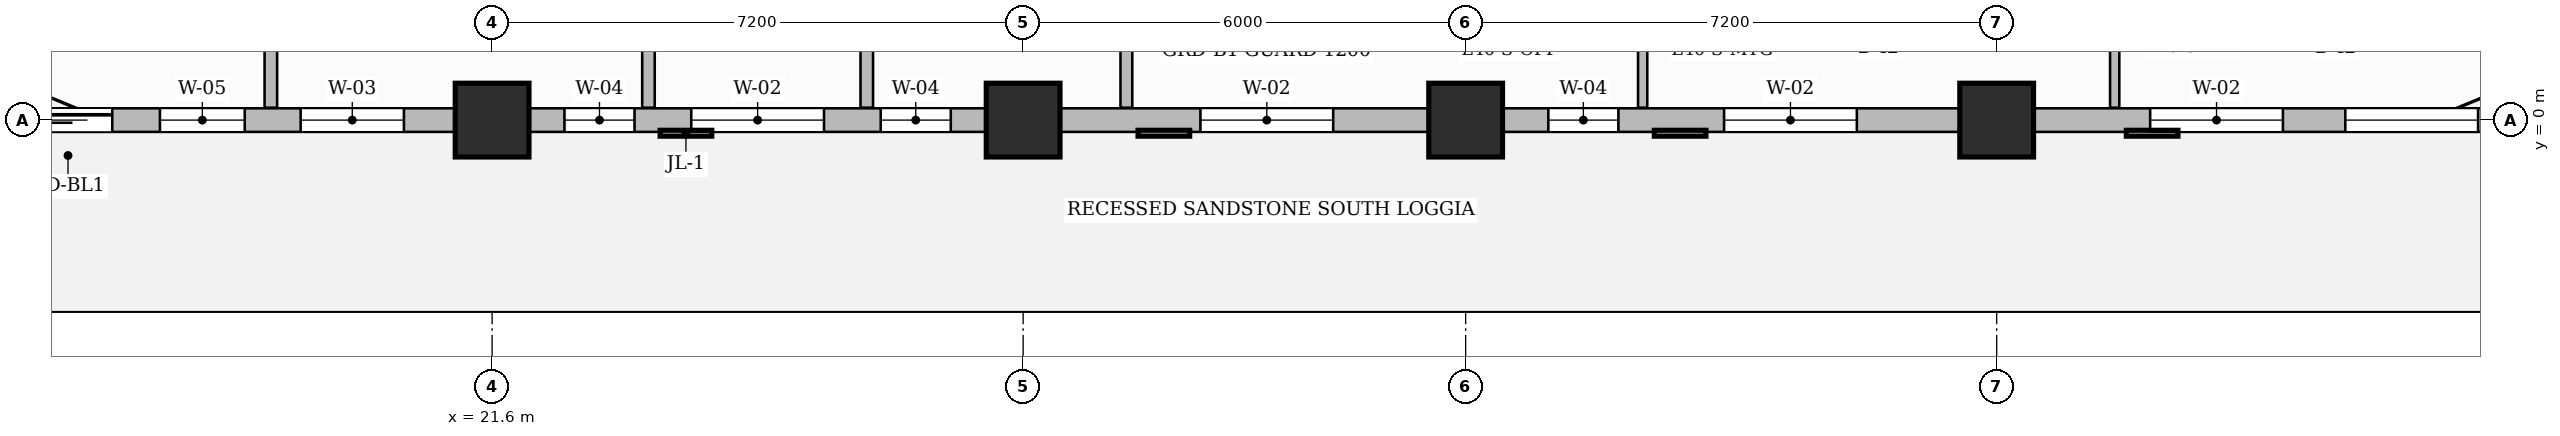
"""IFC4 building model, lengths in metres.
Left out: names, types, materials, properties, quantities, classifications, styles, units other than length and angle.
Written with IfcOpenShell. Run it as: python <this file> out.ifc"""

import sys

from ifc_helpers import new_model, si_unit, direction, frame, frame_2d, origin, origin_2d, place, context, subcontext, project, spatial, rectangle, extrude, source, transform, mapped, element, fill, save


model = new_model("IFC4")
c1 = context("Model", 3, precision=1e-05, world=origin(), true_north=direction((0.0, 1.0)))
c2 = subcontext(c1, "Body", "Model", "MODEL_VIEW")
j1 = project(units=[si_unit("LENGTHUNIT", "METRE"), si_unit("PLANEANGLEUNIT", "RADIAN")], contexts=[c1])
p1 = place(None, origin())
s1 = spatial("IfcSite", under=j1, at=p1, CompositionType="ELEMENT")
p2 = place(p1, origin())
s2 = spatial("IfcBuilding", under=s1, at=p2, CompositionType="ELEMENT")
p3 = place(p2, frame((0.0, 0.0, 161.85)))
s3 = spatial("IfcBuildingStorey", under=s2, at=p3, CompositionType="ELEMENT", Elevation=161.85)
m1 = source(origin(), c2, "Body", "SweptSolid", [
    extrude(rectangle(XDim=1.0, YDim=1.0, at=origin_2d()), origin(), (0.0, 0.0, 1.0), 3.85),
])
for number, where, z_axis, x_axis in (
    (1, (21.6, 0.0, 0.0), (0.0, 0.0, 1.0), (1.0, 0.0, 0.0)),
    (2, (28.8, 0.0, 0.0), (0.0, 0.0, 1.0), (1.0, 0.0, 0.0)),
    (3, (34.8, 0.0, 0.0), (0.0, 0.0, 1.0), (1.0, 0.0, 0.0)),
    (4, (42.0, 0.0, 0.0), (0.0, 0.0, 1.0), (1.0, 0.0, 0.0)),
):
    element("IfcColumn", number, at=place(p3, frame(where, z_axis=z_axis, x_axis=x_axis)), inside=s3, PredefinedType="COLUMN", context=c2, shape_type="MappedRepresentation", body=[
        mapped(m1, transform((0.0, 0.0, 0.0), scale=1.0)),
    ])
p4 = place(p3, frame((30.2, 0.168, 0.0), z_axis=(0.0, 0.0, 1.0), x_axis=(0.0, 1.0, 0.0)))
e5 = element("IfcWall", 5, at=p4, inside=s3, PredefinedType="PARTITIONING", context=c2, shape_type="SweptSolid", body=[
    extrude(rectangle(XDim=8.892, YDim=0.16, at=frame_2d((4.446, 0.0))), origin(), (0.0, 0.0, 1.0), 3.6),
])
p5 = place(p4, frame((1.957, 0.0, 0.0)))
e6 = element("IfcOpeningElement", 6, at=p5, cuts=e5, PredefinedType="OPENING", context=c2, shape_type="SweptSolid", body=[
    extrude(rectangle(XDim=1.05, YDim=2.15, at=frame_2d((0.525, 1.075))), frame((0.0, 0.09, 0.0), z_axis=(0.0, -1.0, 0.0), x_axis=(1.0, 0.0, 0.0)), (0.0, 0.0, 1.0), 0.18),
])
for number, where, z_axis, x_axis in (
    (7, (37.2, 0.168, 0.0), (0.0, 0.0, 1.0), (0.0, 1.0, 0.0)),
    (8, (43.6, 0.168, 0.0), (0.0, 0.0, 1.0), (0.0, 1.0, 0.0)),
):
    element("IfcWall", number, at=place(p3, frame(where, z_axis=z_axis, x_axis=x_axis)), inside=s3, PredefinedType="PARTITIONING", context=c2, shape_type="SweptSolid", body=[
        extrude(rectangle(XDim=1.542, YDim=0.125, at=frame_2d((0.771, 0.0))), origin(), (0.0, 0.0, 1.0), 3.6),
    ])
for number, where, z_axis, x_axis in (
    (9, (18.6, 0.168, 0.0), (0.0, 0.0, 1.0), (0.0, 1.0, 0.0)),
    (10, (23.72, 0.168, 0.0), (0.0, 0.0, 1.0), (0.0, 1.0, 0.0)),
    (11, (26.68, 0.168, 0.0), (0.0, 0.0, 1.0), (0.0, 1.0, 0.0)),
):
    element("IfcWall", number, at=place(p3, frame(where, z_axis=z_axis, x_axis=x_axis)), inside=s3, PredefinedType="PARTITIONING", context=c2, shape_type="SweptSolid", body=[
        extrude(rectangle(XDim=8.892, YDim=0.17, at=frame_2d((4.446, 0.0))), origin(), (0.0, 0.0, 1.0), 3.6),
    ])
p6 = place(p3, frame((14.4, 0.0, 0.0), z_axis=(0.0, 0.0, 1.0), x_axis=(1.0, 0.0, 0.0)))
e12 = element("IfcWall", 12, at=p6, inside=s3, PredefinedType="SOLIDWALL", context=c2, shape_type="SweptSolid", body=[
    extrude(rectangle(XDim=35.4, YDim=0.32, at=frame_2d((17.7, 0.0))), origin(), (0.0, 0.0, 1.0), 3.085),
])
p7 = place(p6, frame((0.85, 0.0, 0.0)))
e13 = element("IfcOpeningElement", 13, at=p7, cuts=e12, PredefinedType="OPENING", context=c2, shape_type="SweptSolid", body=[
    extrude(rectangle(XDim=1.2, YDim=2.2, at=frame_2d((0.6, 1.1))), frame((0.0, 0.17, 0.0), z_axis=(0.0, -1.0, 0.0), x_axis=(1.0, 0.0, 0.0)), (0.0, 0.0, 1.0), 0.34),
])
p8 = place(p6, frame((2.696, 0.0, 0.8)))
e14 = element("IfcOpeningElement", 14, at=p8, cuts=e12, PredefinedType="OPENING", context=c2, shape_type="SweptSolid", body=[
    extrude(rectangle(XDim=1.15, YDim=1.8, at=frame_2d((0.575, 0.9))), frame((0.0, 0.17, 0.0), z_axis=(0.0, -1.0, 0.0), x_axis=(1.0, 0.0, 0.0)), (0.0, 0.0, 1.0), 0.34),
])
p9 = place(p6, frame((4.604, 0.0, 0.8)))
e15 = element("IfcOpeningElement", 15, at=p9, cuts=e12, PredefinedType="OPENING", context=c2, shape_type="SweptSolid", body=[
    extrude(rectangle(XDim=1.4, YDim=1.85, at=frame_2d((0.7, 0.925))), frame((0.0, 0.17, 0.0), z_axis=(0.0, -1.0, 0.0), x_axis=(1.0, 0.0, 0.0)), (0.0, 0.0, 1.0), 0.34),
])
p10 = place(p6, frame((8.181, 0.0, 0.8)))
e16 = element("IfcOpeningElement", 16, at=p10, cuts=e12, PredefinedType="OPENING", context=c2, shape_type="SweptSolid", body=[
    extrude(rectangle(XDim=0.95, YDim=1.75, at=frame_2d((0.475, 0.875))), frame((0.0, 0.17, 0.0), z_axis=(0.0, -1.0, 0.0), x_axis=(1.0, 0.0, 0.0)), (0.0, 0.0, 1.0), 0.34),
])
p11 = place(p6, frame((9.9, 0.0, 0.8)))
e17 = element("IfcOpeningElement", 17, at=p11, cuts=e12, PredefinedType="OPENING", context=c2, shape_type="SweptSolid", body=[
    extrude(rectangle(XDim=1.8, YDim=1.85, at=frame_2d((0.9, 0.925))), frame((0.0, 0.17, 0.0), z_axis=(0.0, -1.0, 0.0), x_axis=(1.0, 0.0, 0.0)), (0.0, 0.0, 1.0), 0.34),
])
p12 = place(p6, frame((12.469, 0.0, 0.8)))
e18 = element("IfcOpeningElement", 18, at=p12, cuts=e12, PredefinedType="OPENING", context=c2, shape_type="SweptSolid", body=[
    extrude(rectangle(XDim=0.95, YDim=1.75, at=frame_2d((0.475, 0.875))), frame((0.0, 0.17, 0.0), z_axis=(0.0, -1.0, 0.0), x_axis=(1.0, 0.0, 0.0)), (0.0, 0.0, 1.0), 0.34),
])
p13 = place(p6, frame((16.804, 0.0, 0.8)))
e19 = element("IfcOpeningElement", 19, at=p13, cuts=e12, PredefinedType="OPENING", context=c2, shape_type="SweptSolid", body=[
    extrude(rectangle(XDim=1.8, YDim=1.85, at=frame_2d((0.9, 0.925))), frame((0.0, 0.17, 0.0), z_axis=(0.0, -1.0, 0.0), x_axis=(1.0, 0.0, 0.0)), (0.0, 0.0, 1.0), 0.34),
])
p14 = place(p6, frame((21.521, 0.0, 0.8)))
e20 = element("IfcOpeningElement", 20, at=p14, cuts=e12, PredefinedType="OPENING", context=c2, shape_type="SweptSolid", body=[
    extrude(rectangle(XDim=0.95, YDim=1.75, at=frame_2d((0.475, 0.875))), frame((0.0, 0.17, 0.0), z_axis=(0.0, -1.0, 0.0), x_axis=(1.0, 0.0, 0.0)), (0.0, 0.0, 1.0), 0.34),
])
p15 = place(p6, frame((23.904, 0.0, 0.8)))
e21 = element("IfcOpeningElement", 21, at=p15, cuts=e12, PredefinedType="OPENING", context=c2, shape_type="SweptSolid", body=[
    extrude(rectangle(XDim=1.8, YDim=1.85, at=frame_2d((0.9, 0.925))), frame((0.0, 0.17, 0.0), z_axis=(0.0, -1.0, 0.0), x_axis=(1.0, 0.0, 0.0)), (0.0, 0.0, 1.0), 0.34),
])
p16 = place(p6, frame((29.681, 0.0, 0.8)))
e22 = element("IfcOpeningElement", 22, at=p16, cuts=e12, PredefinedType="OPENING", context=c2, shape_type="SweptSolid", body=[
    extrude(rectangle(XDim=1.8, YDim=1.85, at=frame_2d((0.9, 0.925))), frame((0.0, 0.17, 0.0), z_axis=(0.0, -1.0, 0.0), x_axis=(1.0, 0.0, 0.0)), (0.0, 0.0, 1.0), 0.34),
])
p17 = place(p6, frame((32.327, 0.0, 0.8)))
e23 = element("IfcOpeningElement", 23, at=p17, cuts=e12, PredefinedType="OPENING", context=c2, shape_type="SweptSolid", body=[
    extrude(rectangle(XDim=1.8, YDim=1.85, at=frame_2d((0.9, 0.925))), frame((0.0, 0.17, 0.0), z_axis=(0.0, -1.0, 0.0), x_axis=(1.0, 0.0, 0.0)), (0.0, 0.0, 1.0), 0.34),
])
m2 = source(origin(), c2, "Body", "SweptSolid", [
    extrude(rectangle(XDim=1.2, YDim=2.2, at=frame_2d((0.6, 1.1))), frame((0.0, 0.025, 0.0), z_axis=(0.0, -1.0, 0.0), x_axis=(1.0, 0.0, 0.0)), (0.0, 0.0, 1.0), 0.05),
])
p18 = place(p7, origin())
e24 = element("IfcDoor", 24, at=p18, inside=s3, OperationType="SLIDING_TO_LEFT", PredefinedType="DOOR", context=c2, shape_type="MappedRepresentation", body=[
    mapped(m2, transform((0.0, 0.0, 0.0), scale=1.0)),
])
fill(e13, e24)
m3 = source(origin(), c2, "Body", "SweptSolid", [
    extrude(rectangle(XDim=1.15, YDim=1.8, at=frame_2d((0.575, 0.9))), frame((0.0, 0.03, 0.0), z_axis=(0.0, -1.0, 0.0), x_axis=(1.0, 0.0, 0.0)), (0.0, 0.0, 1.0), 0.06),
])
p19 = place(p8, origin())
e25 = element("IfcWindow", 25, at=p19, inside=s3, PartitioningType="SINGLE_PANEL", PredefinedType="WINDOW", context=c2, shape_type="MappedRepresentation", body=[
    mapped(m3, transform((0.0, 0.0, 0.0), scale=1.0)),
])
fill(e14, e25)
m4 = source(origin(), c2, "Body", "SweptSolid", [
    extrude(rectangle(XDim=1.4, YDim=1.85, at=frame_2d((0.7, 0.925))), frame((0.0, 0.03, 0.0), z_axis=(0.0, -1.0, 0.0), x_axis=(1.0, 0.0, 0.0)), (0.0, 0.0, 1.0), 0.06),
])
p20 = place(p9, origin())
e26 = element("IfcWindow", 26, at=p20, inside=s3, PartitioningType="SINGLE_PANEL", PredefinedType="WINDOW", context=c2, shape_type="MappedRepresentation", body=[
    mapped(m4, transform((0.0, 0.0, 0.0), scale=1.0)),
])
fill(e15, e26)
m5 = source(origin(), c2, "Body", "SweptSolid", [
    extrude(rectangle(XDim=0.95, YDim=1.75, at=frame_2d((0.475, 0.875))), frame((0.0, 0.03, 0.0), z_axis=(0.0, -1.0, 0.0), x_axis=(1.0, 0.0, 0.0)), (0.0, 0.0, 1.0), 0.06),
])
p21 = place(p10, origin())
e27 = element("IfcWindow", 27, at=p21, inside=s3, PartitioningType="SINGLE_PANEL", PredefinedType="WINDOW", context=c2, shape_type="MappedRepresentation", body=[
    mapped(m5, transform((0.0, 0.0, 0.0), scale=1.0)),
])
fill(e16, e27)
m6 = source(origin(), c2, "Body", "SweptSolid", [
    extrude(rectangle(XDim=1.8, YDim=1.85, at=frame_2d((0.9, 0.925))), frame((0.0, 0.03, 0.0), z_axis=(0.0, -1.0, 0.0), x_axis=(1.0, 0.0, 0.0)), (0.0, 0.0, 1.0), 0.06),
])
p22 = place(p11, origin())
e28 = element("IfcWindow", 28, at=p22, inside=s3, PartitioningType="DOUBLE_PANEL_VERTICAL", PredefinedType="WINDOW", context=c2, shape_type="MappedRepresentation", body=[
    mapped(m6, transform((0.0, 0.0, 0.0), scale=1.0)),
])
fill(e17, e28)
p23 = place(p12, origin())
e29 = element("IfcWindow", 29, at=p23, inside=s3, PartitioningType="SINGLE_PANEL", PredefinedType="WINDOW", context=c2, shape_type="MappedRepresentation", body=[
    mapped(m5, transform((0.0, 0.0, 0.0), scale=1.0)),
])
fill(e18, e29)
p24 = place(p13, origin())
e30 = element("IfcWindow", 30, at=p24, inside=s3, PartitioningType="DOUBLE_PANEL_VERTICAL", PredefinedType="WINDOW", context=c2, shape_type="MappedRepresentation", body=[
    mapped(m6, transform((0.0, 0.0, 0.0), scale=1.0)),
])
fill(e19, e30)
p25 = place(p14, origin())
e31 = element("IfcWindow", 31, at=p25, inside=s3, PartitioningType="SINGLE_PANEL", PredefinedType="WINDOW", context=c2, shape_type="MappedRepresentation", body=[
    mapped(m5, transform((0.0, 0.0, 0.0), scale=1.0)),
])
fill(e20, e31)
p26 = place(p15, origin())
e32 = element("IfcWindow", 32, at=p26, inside=s3, PartitioningType="DOUBLE_PANEL_VERTICAL", PredefinedType="WINDOW", context=c2, shape_type="MappedRepresentation", body=[
    mapped(m6, transform((0.0, 0.0, 0.0), scale=1.0)),
])
fill(e21, e32)
p27 = place(p16, origin())
e33 = element("IfcWindow", 33, at=p27, inside=s3, PartitioningType="DOUBLE_PANEL_VERTICAL", PredefinedType="WINDOW", context=c2, shape_type="MappedRepresentation", body=[
    mapped(m6, transform((0.0, 0.0, 0.0), scale=1.0)),
])
fill(e22, e33)
p28 = place(p17, origin())
e34 = element("IfcWindow", 34, at=p28, inside=s3, PartitioningType="DOUBLE_PANEL_VERTICAL", PredefinedType="WINDOW", context=c2, shape_type="MappedRepresentation", body=[
    mapped(m6, transform((0.0, 0.0, 0.0), scale=1.0)),
])
fill(e23, e34)
save(model, sys.argv[1])
